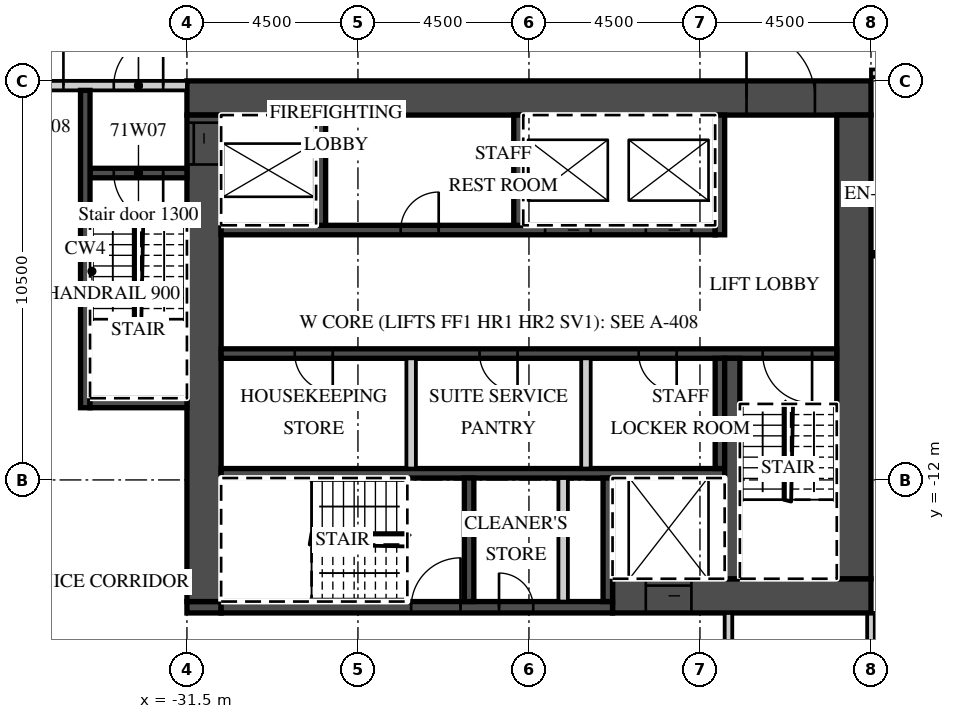
"""IFC4 building model, lengths in metres.
Left out: names, types, materials, properties, quantities, classifications, styles, units other than length and angle.
Written with IfcOpenShell. Run it as: python <this file> out.ifc"""

import sys

from ifc_helpers import new_model, si_unit, direction, frame, frame_2d, origin, place, context, subcontext, project, spatial, rectangle, extrude, element, fill, save


model = new_model("IFC4")
c1 = context("Model", 3, precision=1e-05, world=origin(), true_north=direction((0.0, 1.0)))
c2 = subcontext(c1, "Body", "Model", "MODEL_VIEW")
j1 = project(units=[si_unit("LENGTHUNIT", "METRE"), si_unit("PLANEANGLEUNIT", "RADIAN")], contexts=[c1])
p1 = place(None, origin())
s1 = spatial("IfcSite", under=j1, at=p1, CompositionType="ELEMENT")
p2 = place(p1, origin())
s2 = spatial("IfcBuilding", under=s1, at=p2, CompositionType="ELEMENT")
p3 = place(p2, frame((0.0, 0.0, 285.0)))
s3 = spatial("IfcBuildingStorey", under=s2, at=p3, CompositionType="ELEMENT", Elevation=285.0)
p4 = place(p3, frame((-13.5, -21.396, 0.0), z_axis=(0.0, 0.0, 1.0), x_axis=(0.0, 1.0, 0.0)))
e1 = element("IfcWall", 1, at=p4, inside=s3, PredefinedType="PARTITIONING", context=c2, shape_type="SweptSolid", body=[
    extrude(rectangle(XDim=5.896, YDim=0.2, at=frame_2d((2.948, 0.0))), origin(), (0.0, 0.0, 1.0), 3.02),
])
p5 = place(p3, frame((-13.5, -1.3, 0.0), z_axis=(0.0, 0.0, 1.0), x_axis=(1.0, 0.0, 0.0)))
e2 = element("IfcWall", 2, at=p5, inside=s3, PredefinedType="PARTITIONING", context=c2, shape_type="SweptSolid", body=[
    extrude(rectangle(XDim=50.293, YDim=0.2, at=frame_2d((25.146, 0.0))), origin(), (0.0, 0.0, 1.0), 3.02),
])
p6 = place(p5, frame((2.925, 0.0, 0.0)))
e3 = element("IfcOpeningElement", 3, at=p6, cuts=e2, PredefinedType="OPENING", context=c2, shape_type="SweptSolid", body=[
    extrude(rectangle(XDim=1.0, YDim=2.1, at=frame_2d((0.5, 1.05))), frame((0.0, 0.11, 0.0), z_axis=(0.0, -1.0, 0.0), x_axis=(1.0, 0.0, 0.0)), (0.0, 0.0, 1.0), 0.22),
])
p7 = place(p5, frame((6.938, 0.0, 0.0)))
e4 = element("IfcOpeningElement", 4, at=p7, cuts=e2, PredefinedType="OPENING", context=c2, shape_type="SweptSolid", body=[
    extrude(rectangle(XDim=1.2, YDim=2.1, at=frame_2d((0.6, 1.05))), frame((0.0, 0.11, 0.0), z_axis=(0.0, -1.0, 0.0), x_axis=(1.0, 0.0, 0.0)), (0.0, 0.0, 1.0), 0.22),
])
p8 = place(p5, frame((14.075, 0.0, 0.0)))
e5 = element("IfcOpeningElement", 5, at=p8, cuts=e2, PredefinedType="OPENING", context=c2, shape_type="SweptSolid", body=[
    extrude(rectangle(XDim=1.0, YDim=2.1, at=frame_2d((0.5, 1.05))), frame((0.0, 0.11, 0.0), z_axis=(0.0, -1.0, 0.0), x_axis=(1.0, 0.0, 0.0)), (0.0, 0.0, 1.0), 0.22),
])
p9 = place(p5, frame((18.55, 0.0, 0.0)))
e6 = element("IfcOpeningElement", 6, at=p9, cuts=e2, PredefinedType="OPENING", context=c2, shape_type="SweptSolid", body=[
    extrude(rectangle(XDim=1.0, YDim=2.1, at=frame_2d((0.5, 1.05))), frame((0.0, 0.11, 0.0), z_axis=(0.0, -1.0, 0.0), x_axis=(1.0, 0.0, 0.0)), (0.0, 0.0, 1.0), 0.22),
])
p10 = place(p5, frame((23.075, 0.0, 0.0)))
e7 = element("IfcOpeningElement", 7, at=p10, cuts=e2, PredefinedType="OPENING", context=c2, shape_type="SweptSolid", body=[
    extrude(rectangle(XDim=1.0, YDim=2.1, at=frame_2d((0.5, 1.05))), frame((0.0, 0.11, 0.0), z_axis=(0.0, -1.0, 0.0), x_axis=(1.0, 0.0, 0.0)), (0.0, 0.0, 1.0), 0.22),
])
p11 = place(p5, frame((29.925, 0.0, 0.0)))
e8 = element("IfcOpeningElement", 8, at=p11, cuts=e2, PredefinedType="OPENING", context=c2, shape_type="SweptSolid", body=[
    extrude(rectangle(XDim=1.0, YDim=2.1, at=frame_2d((0.5, 1.05))), frame((0.0, 0.11, 0.0), z_axis=(0.0, -1.0, 0.0), x_axis=(1.0, 0.0, 0.0)), (0.0, 0.0, 1.0), 0.22),
])
p12 = place(p5, frame((32.075, 0.0, 0.0)))
e9 = element("IfcOpeningElement", 9, at=p12, cuts=e2, PredefinedType="OPENING", context=c2, shape_type="SweptSolid", body=[
    extrude(rectangle(XDim=1.0, YDim=2.1, at=frame_2d((0.5, 1.05))), frame((0.0, 0.11, 0.0), z_axis=(0.0, -1.0, 0.0), x_axis=(1.0, 0.0, 0.0)), (0.0, 0.0, 1.0), 0.22),
])
p13 = place(p5, frame((36.55, 0.0, 0.0)))
e10 = element("IfcOpeningElement", 10, at=p13, cuts=e2, PredefinedType="OPENING", context=c2, shape_type="SweptSolid", body=[
    extrude(rectangle(XDim=1.0, YDim=2.1, at=frame_2d((0.5, 1.05))), frame((0.0, 0.11, 0.0), z_axis=(0.0, -1.0, 0.0), x_axis=(1.0, 0.0, 0.0)), (0.0, 0.0, 1.0), 0.22),
])
p14 = place(p5, frame((42.938, 0.0, 0.0)))
e11 = element("IfcOpeningElement", 11, at=p14, cuts=e2, PredefinedType="OPENING", context=c2, shape_type="SweptSolid", body=[
    extrude(rectangle(XDim=1.2, YDim=2.1, at=frame_2d((0.6, 1.05))), frame((0.0, 0.11, 0.0), z_axis=(0.0, -1.0, 0.0), x_axis=(1.0, 0.0, 0.0)), (0.0, 0.0, 1.0), 0.22),
])
p15 = place(p3, frame((-31.5, -1.95, 0.0), z_axis=(0.0, 0.0, 1.0), x_axis=(1.0, 0.0, 0.0)))
e12 = element("IfcWall", 12, at=p15, inside=s3, PredefinedType="SHEAR", context=c2, shape_type="SweptSolid", body=[
    extrude(rectangle(XDim=18.0, YDim=0.9, at=frame_2d((9.0, 0.0))), origin(), (0.0, 0.0, 1.0), 3.02),
])
p16 = place(p15, frame((14.725, 0.0, 0.0)))
e13 = element("IfcOpeningElement", 13, at=p16, cuts=e12, PredefinedType="OPENING", context=c2, shape_type="SweptSolid", body=[
    extrude(rectangle(XDim=1.8, YDim=2.1, at=frame_2d((0.9, 1.05))), frame((0.0, 0.46, 0.0), z_axis=(0.0, -1.0, 0.0), x_axis=(1.0, 0.0, 0.0)), (0.0, 0.0, 1.0), 0.92),
])
p17 = place(p3, frame((-20.3, -15.05, 0.0), z_axis=(0.0, 0.0, 1.0), x_axis=(1.0, 0.0, 0.0)))
e14 = element("IfcWall", 14, at=p17, inside=s3, PredefinedType="SHEAR", context=c2, shape_type="SweptSolid", body=[
    extrude(rectangle(XDim=6.8, YDim=0.9, at=frame_2d((3.4, 0.0))), origin(), (0.0, 0.0, 1.0), 3.02),
])
p18 = place(p17, frame((0.875, 0.0, 0.0)))
e15 = element("IfcOpeningElement", 15, at=p18, cuts=e14, PredefinedType="OPENING", context=c2, shape_type="SweptSolid", body=[
    extrude(rectangle(XDim=1.2, YDim=2.1, at=frame_2d((0.6, 1.05))), frame((0.0, 0.46, 0.0), z_axis=(0.0, -1.0, 0.0), x_axis=(1.0, 0.0, 0.0)), (0.0, 0.0, 1.0), 0.92),
])
p19 = place(p3, frame((-31.5, -15.35, 0.0), z_axis=(0.0, 0.0, 1.0), x_axis=(1.0, 0.0, 0.0)))
e16 = element("IfcWall", 16, at=p19, inside=s3, PredefinedType="SHEAR", context=c2, shape_type="SweptSolid", body=[
    extrude(rectangle(XDim=0.9, YDim=0.3, at=frame_2d((0.45, 0.0))), origin(), (0.0, 0.0, 1.0), 3.02),
])
p20 = place(p3, frame((-30.6, -15.35, 0.0), z_axis=(0.0, 0.0, 1.0), x_axis=(1.0, 0.0, 0.0)))
e17 = element("IfcWall", 17, at=p20, inside=s3, PredefinedType="SHEAR", context=c2, shape_type="SweptSolid", body=[
    extrude(rectangle(XDim=10.3, YDim=0.3, at=frame_2d((5.15, 0.0))), origin(), (0.0, 0.0, 1.0), 3.02),
])
p21 = place(p20, frame((5.0, 0.0, 0.0)))
e18 = element("IfcOpeningElement", 18, at=p21, cuts=e17, PredefinedType="OPENING", context=c2, shape_type="SweptSolid", body=[
    extrude(rectangle(XDim=1.3, YDim=2.1, at=frame_2d((0.65, 1.05))), frame((0.0, 0.16, 0.0), z_axis=(0.0, -1.0, 0.0), x_axis=(1.0, 0.0, 0.0)), (0.0, 0.0, 1.0), 0.32),
])
p22 = place(p20, frame((7.312, 0.0, 0.0)))
e19 = element("IfcOpeningElement", 19, at=p22, cuts=e17, PredefinedType="OPENING", context=c2, shape_type="SweptSolid", body=[
    extrude(rectangle(XDim=0.9, YDim=2.1, at=frame_2d((0.45, 1.05))), frame((0.0, 0.16, 0.0), z_axis=(0.0, -1.0, 0.0), x_axis=(1.0, 0.0, 0.0)), (0.0, 0.0, 1.0), 0.32),
])
p23 = place(p3, frame((-31.05, -15.2, 0.0), z_axis=(0.0, 0.0, 1.0), x_axis=(0.0, 1.0, 0.0)))
e20 = element("IfcWall", 20, at=p23, inside=s3, PredefinedType="SHEAR", context=c2, shape_type="SweptSolid", body=[
    extrude(rectangle(XDim=12.8, YDim=0.9, at=frame_2d((6.4, 0.0))), origin(), (0.0, 0.0, 1.0), 3.02),
])
p24 = place(p23, frame((11.5, 0.0, 0.0)))
e21 = element("IfcOpeningElement", 21, at=p24, cuts=e20, PredefinedType="OPENING", context=c2, shape_type="SweptSolid", body=[
    extrude(rectangle(XDim=1.1, YDim=2.1, at=frame_2d((0.55, 1.05))), frame((0.0, 0.46, 0.0), z_axis=(0.0, -1.0, 0.0), x_axis=(1.0, 0.0, 0.0)), (0.0, 0.0, 1.0), 0.92),
])
p25 = place(p3, frame((-13.95, -14.6, 0.0), z_axis=(0.0, 0.0, 1.0), x_axis=(0.0, 1.0, 0.0)))
e22 = element("IfcWall", 22, at=p25, inside=s3, PredefinedType="SHEAR", context=c2, shape_type="SweptSolid", body=[
    extrude(rectangle(XDim=12.2, YDim=0.9, at=frame_2d((6.1, 0.0))), origin(), (0.0, 0.0, 1.0), 3.02),
])
p26 = place(p3, frame((-30.6, -5.425, 0.0), z_axis=(0.0, 0.0, 1.0), x_axis=(1.0, 0.0, 0.0)))
e23 = element("IfcWall", 23, at=p26, inside=s3, PredefinedType="SHEAR", context=c2, shape_type="SweptSolid", body=[
    extrude(rectangle(XDim=13.0, YDim=0.25, at=frame_2d((6.5, 0.0))), origin(), (0.0, 0.0, 1.0), 3.02),
])
p27 = place(p26, frame((8.525, 0.0, 0.0)))
e24 = element("IfcOpeningElement", 24, at=p27, cuts=e23, PredefinedType="OPENING", context=c2, shape_type="SweptSolid", body=[
    extrude(rectangle(XDim=1.2, YDim=2.1, at=frame_2d((0.6, 1.05))), frame((0.0, 0.135, 0.0), z_axis=(0.0, -1.0, 0.0), x_axis=(1.0, 0.0, 0.0)), (0.0, 0.0, 1.0), 0.27),
])
p28 = place(p26, frame((11.175, 0.0, 0.0)))
e25 = element("IfcOpeningElement", 25, at=p28, cuts=e23, PredefinedType="OPENING", context=c2, shape_type="SweptSolid", body=[
    extrude(rectangle(XDim=1.2, YDim=2.1, at=frame_2d((0.6, 1.05))), frame((0.0, 0.135, 0.0), z_axis=(0.0, -1.0, 0.0), x_axis=(1.0, 0.0, 0.0)), (0.0, 0.0, 1.0), 0.27),
])
p29 = place(p26, frame((4.725, 0.0, 0.0)))
e26 = element("IfcOpeningElement", 26, at=p29, cuts=e23, PredefinedType="OPENING", context=c2, shape_type="SweptSolid", body=[
    extrude(rectangle(XDim=1.0, YDim=2.1, at=frame_2d((0.5, 1.05))), frame((0.0, 0.135, 0.0), z_axis=(0.0, -1.0, 0.0), x_axis=(1.0, 0.0, 0.0)), (0.0, 0.0, 1.0), 0.27),
])
p30 = place(p3, frame((-17.475, -5.55, 0.0), z_axis=(0.0, 0.0, 1.0), x_axis=(0.0, 1.0, 0.0)))
e27 = element("IfcWall", 27, at=p30, inside=s3, PredefinedType="SHEAR", context=c2, shape_type="SweptSolid", body=[
    extrude(rectangle(XDim=3.15, YDim=0.25, at=frame_2d((1.575, 0.0))), origin(), (0.0, 0.0, 1.0), 3.02),
])
for number, where, z_axis, x_axis in (
    (28, (-27.975, -5.3, 0.0), (0.0, 0.0, 1.0), (0.0, 1.0, 0.0)),
    (29, (-22.775, -5.3, 0.0), (0.0, 0.0, 1.0), (0.0, 1.0, 0.0)),
):
    element("IfcWall", number, at=place(p3, frame(where, z_axis=z_axis, x_axis=x_axis)), inside=s3, PredefinedType="SHEAR", context=c2, shape_type="SweptSolid", body=[
        extrude(rectangle(XDim=2.9, YDim=0.25, at=frame_2d((1.45, 0.0))), origin(), (0.0, 0.0, 1.0), 3.02),
    ])
p31 = place(p3, frame((-30.6, -8.675, 0.0), z_axis=(0.0, 0.0, 1.0), x_axis=(1.0, 0.0, 0.0)))
e30 = element("IfcWall", 30, at=p31, inside=s3, PredefinedType="SHEAR", context=c2, shape_type="SweptSolid", body=[
    extrude(rectangle(XDim=16.2, YDim=0.25, at=frame_2d((8.1, 0.0))), origin(), (0.0, 0.0, 1.0), 3.02),
])
p32 = place(p31, frame((14.25, 0.0, 0.0)))
e31 = element("IfcOpeningElement", 31, at=p32, cuts=e30, PredefinedType="OPENING", context=c2, shape_type="SweptSolid", body=[
    extrude(rectangle(XDim=1.3, YDim=2.1, at=frame_2d((0.65, 1.05))), frame((0.0, 0.135, 0.0), z_axis=(0.0, -1.0, 0.0), x_axis=(1.0, 0.0, 0.0)), (0.0, 0.0, 1.0), 0.27),
])
p33 = place(p31, frame((1.938, 0.0, 0.0)))
e32 = element("IfcOpeningElement", 32, at=p33, cuts=e30, PredefinedType="OPENING", context=c2, shape_type="SweptSolid", body=[
    extrude(rectangle(XDim=1.0, YDim=2.1, at=frame_2d((0.5, 1.05))), frame((0.0, 0.135, 0.0), z_axis=(0.0, -1.0, 0.0), x_axis=(1.0, 0.0, 0.0)), (0.0, 0.0, 1.0), 0.27),
])
p34 = place(p31, frame((6.8, 0.0, 0.0)))
e33 = element("IfcOpeningElement", 33, at=p34, cuts=e30, PredefinedType="OPENING", context=c2, shape_type="SweptSolid", body=[
    extrude(rectangle(XDim=1.0, YDim=2.1, at=frame_2d((0.5, 1.05))), frame((0.0, 0.135, 0.0), z_axis=(0.0, -1.0, 0.0), x_axis=(1.0, 0.0, 0.0)), (0.0, 0.0, 1.0), 0.27),
])
p35 = place(p31, frame((10.988, 0.0, 0.0)))
e34 = element("IfcOpeningElement", 34, at=p35, cuts=e30, PredefinedType="OPENING", context=c2, shape_type="SweptSolid", body=[
    extrude(rectangle(XDim=1.0, YDim=2.1, at=frame_2d((0.5, 1.05))), frame((0.0, 0.135, 0.0), z_axis=(0.0, -1.0, 0.0), x_axis=(1.0, 0.0, 0.0)), (0.0, 0.0, 1.0), 0.27),
])
p36 = place(p3, frame((-30.6, -11.825, 0.0), z_axis=(0.0, 0.0, 1.0), x_axis=(1.0, 0.0, 0.0)))
e35 = element("IfcWall", 35, at=p36, inside=s3, PredefinedType="SHEAR", context=c2, shape_type="SweptSolid", body=[
    extrude(rectangle(XDim=13.25, YDim=0.25, at=frame_2d((6.625, 0.0))), origin(), (0.0, 0.0, 1.0), 3.02),
])
p37 = place(p3, frame((-17.475, -11.7, 0.0), z_axis=(0.0, 0.0, 1.0), x_axis=(0.0, 1.0, 0.0)))
e36 = element("IfcWall", 36, at=p37, inside=s3, PredefinedType="SHEAR", context=c2, shape_type="SweptSolid", body=[
    extrude(rectangle(XDim=2.9, YDim=0.25, at=frame_2d((1.45, 0.0))), origin(), (0.0, 0.0, 1.0), 3.02),
])
for number, where, z_axis, x_axis in (
    (37, (-25.6, -11.7, 0.0), (0.0, 0.0, 1.0), (0.0, 1.0, 0.0)),
    (38, (-21.0, -11.7, 0.0), (0.0, 0.0, 1.0), (0.0, 1.0, 0.0)),
):
    element("IfcWall", number, at=place(p3, frame(where, z_axis=z_axis, x_axis=x_axis)), inside=s3, PredefinedType="PARTITIONING", context=c2, shape_type="SweptSolid", body=[
        extrude(rectangle(XDim=2.9, YDim=0.25, at=frame_2d((1.45, 0.0))), origin(), (0.0, 0.0, 1.0), 3.02),
    ])
p38 = place(p3, frame((-17.15, -14.6, 0.0), z_axis=(0.0, 0.0, 1.0), x_axis=(0.0, 1.0, 0.0)))
e39 = element("IfcWall", 39, at=p38, inside=s3, PredefinedType="SHEAR", context=c2, shape_type="SweptSolid", body=[
    extrude(rectangle(XDim=5.8, YDim=0.4, at=frame_2d((2.9, 0.0))), origin(), (0.0, 0.0, 1.0), 3.02),
])
for number, where, z_axis, x_axis in (
    (40, (-20.425, -15.2, 0.0), (0.0, 0.0, 1.0), (0.0, 1.0, 0.0)),
    (41, (-24.075, -15.2, 0.0), (0.0, 0.0, 1.0), (0.0, 1.0, 0.0)),
):
    element("IfcWall", number, at=place(p3, frame(where, z_axis=z_axis, x_axis=x_axis)), inside=s3, PredefinedType="SHEAR", context=c2, shape_type="SweptSolid", body=[
        extrude(rectangle(XDim=3.25, YDim=0.25, at=frame_2d((1.625, 0.0))), origin(), (0.0, 0.0, 1.0), 3.02),
    ])
p39 = place(p3, frame((-21.6, -15.2, 0.0), z_axis=(0.0, 0.0, 1.0), x_axis=(0.0, 1.0, 0.0)))
e42 = element("IfcWall", 42, at=p39, inside=s3, PredefinedType="PARTITIONING", context=c2, shape_type="SweptSolid", body=[
    extrude(rectangle(XDim=3.25, YDim=0.25, at=frame_2d((1.625, 0.0))), origin(), (0.0, 0.0, 1.0), 3.02),
])
p40 = place(p3, frame((-39.627, -1.625, 0.0), z_axis=(0.0, 0.0, 1.0), x_axis=(1.0, 0.0, 0.0)))
e43 = element("IfcWall", 43, at=p40, inside=s3, PredefinedType="PARTITIONING", context=c2, shape_type="SweptSolid", body=[
    extrude(rectangle(XDim=8.127, YDim=0.25, at=frame_2d((4.063, 0.0))), origin(), (0.0, 0.0, 1.0), 3.02),
])
p41 = place(p40, frame((6.202, 0.0, 0.0)))
e44 = element("IfcOpeningElement", 44, at=p41, cuts=e43, PredefinedType="OPENING", context=c2, shape_type="SweptSolid", body=[
    extrude(rectangle(XDim=1.3, YDim=2.1, at=frame_2d((0.65, 1.05))), frame((0.0, 0.135, 0.0), z_axis=(0.0, -1.0, 0.0), x_axis=(1.0, 0.0, 0.0)), (0.0, 0.0, 1.0), 0.27),
])
p42 = place(p40, frame((3.777, 0.0, 0.0)))
e45 = element("IfcOpeningElement", 45, at=p42, cuts=e43, PredefinedType="OPENING", context=c2, shape_type="SweptSolid", body=[
    extrude(rectangle(XDim=1.1, YDim=2.1, at=frame_2d((0.55, 1.05))), frame((0.0, 0.135, 0.0), z_axis=(0.0, -1.0, 0.0), x_axis=(1.0, 0.0, 0.0)), (0.0, 0.0, 1.0), 0.27),
])
p43 = place(p3, frame((-34.05, -3.925, 0.0), z_axis=(0.0, 0.0, 1.0), x_axis=(1.0, 0.0, 0.0)))
e46 = element("IfcWall", 46, at=p43, inside=s3, PredefinedType="SHEAR", context=c2, shape_type="SweptSolid", body=[
    extrude(rectangle(XDim=2.55, YDim=0.25, at=frame_2d((1.275, 0.0))), origin(), (0.0, 0.0, 1.0), 3.02),
])
p44 = place(p43, frame((0.625, 0.0, 0.0)))
e47 = element("IfcOpeningElement", 47, at=p44, cuts=e46, PredefinedType="OPENING", context=c2, shape_type="SweptSolid", body=[
    extrude(rectangle(XDim=1.3, YDim=2.1, at=frame_2d((0.65, 1.05))), frame((0.0, 0.135, 0.0), z_axis=(0.0, -1.0, 0.0), x_axis=(1.0, 0.0, 0.0)), (0.0, 0.0, 1.0), 0.27),
])
p45 = place(p3, frame((-34.175, -10.1, 0.0), z_axis=(0.0, 0.0, 1.0), x_axis=(0.0, 1.0, 0.0)))
e48 = element("IfcWall", 48, at=p45, inside=s3, PredefinedType="SHEAR", context=c2, shape_type="SweptSolid", body=[
    extrude(rectangle(XDim=8.35, YDim=0.25, at=frame_2d((4.175, 0.0))), origin(), (0.0, 0.0, 1.0), 3.02),
])
p46 = place(p3, frame((-34.05, -9.975, 0.0), z_axis=(0.0, 0.0, 1.0), x_axis=(1.0, 0.0, 0.0)))
e49 = element("IfcWall", 49, at=p46, inside=s3, PredefinedType="SHEAR", context=c2, shape_type="SweptSolid", body=[
    extrude(rectangle(XDim=2.55, YDim=0.25, at=frame_2d((1.275, 0.0))), origin(), (0.0, 0.0, 1.0), 3.02),
])
p47 = place(p3, frame((-17.25, -17.7, 0.0), z_axis=(0.0, 0.0, 1.0), x_axis=(0.0, 1.0, 0.0)))
e50 = element("IfcWall", 50, at=p47, inside=s3, PredefinedType="PARTITIONING", context=c2, shape_type="SweptSolid", body=[
    extrude(rectangle(XDim=2.2, YDim=0.2, at=frame_2d((1.1, 0.0))), origin(), (0.0, 0.0, 1.0), 3.02),
])
p48 = place(p27, origin())
e51 = element("IfcDoor", 51, at=p48, inside=s3, OperationType="SLIDING_TO_LEFT", PredefinedType="DOOR", context=c2, shape_type="SweptSolid", body=[
    extrude(rectangle(XDim=1.2, YDim=2.1, at=frame_2d((0.6, 1.05))), frame((0.0, 0.025, 0.0), z_axis=(0.0, -1.0, 0.0), x_axis=(1.0, 0.0, 0.0)), (0.0, 0.0, 1.0), 0.05),
])
fill(e24, e51)
p49 = place(p28, origin())
e52 = element("IfcDoor", 52, at=p49, inside=s3, OperationType="SLIDING_TO_RIGHT", PredefinedType="DOOR", context=c2, shape_type="SweptSolid", body=[
    extrude(rectangle(XDim=1.2, YDim=2.1, at=frame_2d((0.6, 1.05))), frame((0.0, 0.025, 0.0), z_axis=(0.0, -1.0, 0.0), x_axis=(1.0, 0.0, 0.0)), (0.0, 0.0, 1.0), 0.05),
])
fill(e25, e52)
p50 = place(p18, origin())
e53 = element("IfcDoor", 53, at=p50, inside=s3, OperationType="SLIDING_TO_LEFT", PredefinedType="DOOR", context=c2, shape_type="SweptSolid", body=[
    extrude(rectangle(XDim=1.2, YDim=2.1, at=frame_2d((0.6, 1.05))), frame((0.0, 0.025, 0.0), z_axis=(0.0, -1.0, 0.0), x_axis=(1.0, 0.0, 0.0)), (0.0, 0.0, 1.0), 0.05),
])
fill(e15, e53)
p51 = place(p24, origin())
e54 = element("IfcDoor", 54, at=p51, inside=s3, OperationType="SLIDING_TO_RIGHT", PredefinedType="DOOR", context=c2, shape_type="SweptSolid", body=[
    extrude(rectangle(XDim=1.1, YDim=2.1, at=frame_2d((0.55, 1.05))), frame((0.0, 0.025, 0.0), z_axis=(0.0, -1.0, 0.0), x_axis=(1.0, 0.0, 0.0)), (0.0, 0.0, 1.0), 0.05),
])
fill(e21, e54)
p52 = place(p16, origin())
e55 = element("IfcDoor", 55, at=p52, inside=s3, OperationType="DOUBLE_DOOR_DOUBLE_SWING", PredefinedType="DOOR", context=c2, shape_type="SweptSolid", body=[
    extrude(rectangle(XDim=1.8, YDim=2.1, at=frame_2d((0.9, 1.05))), frame((0.0, 0.025, 0.0), z_axis=(0.0, -1.0, 0.0), x_axis=(1.0, 0.0, 0.0)), (0.0, 0.0, 1.0), 0.05),
])
fill(e13, e55)
p53 = place(p41, origin())
e56 = element("IfcDoor", 56, at=p53, inside=s3, OperationType="SINGLE_SWING_RIGHT", PredefinedType="DOOR", context=c2, shape_type="SweptSolid", body=[
    extrude(rectangle(XDim=1.3, YDim=2.1, at=frame_2d((0.65, 1.05))), frame((0.0, 0.025, 0.0), z_axis=(0.0, -1.0, 0.0), x_axis=(1.0, 0.0, 0.0)), (0.0, 0.0, 1.0), 0.05),
])
fill(e44, e56)
p54 = place(p44, origin())
e57 = element("IfcDoor", 57, at=p54, inside=s3, OperationType="SINGLE_SWING_RIGHT", PredefinedType="DOOR", context=c2, shape_type="SweptSolid", body=[
    extrude(rectangle(XDim=1.3, YDim=2.1, at=frame_2d((0.65, 1.05))), frame((0.0, 0.025, 0.0), z_axis=(0.0, -1.0, 0.0), x_axis=(1.0, 0.0, 0.0)), (0.0, 0.0, 1.0), 0.05),
])
fill(e47, e57)
p55 = place(p42, origin())
e58 = element("IfcDoor", 58, at=p55, inside=s3, OperationType="SINGLE_SWING_RIGHT", PredefinedType="DOOR", context=c2, shape_type="SweptSolid", body=[
    extrude(rectangle(XDim=1.1, YDim=2.1, at=frame_2d((0.55, 1.05))), frame((0.0, 0.025, 0.0), z_axis=(0.0, -1.0, 0.0), x_axis=(1.0, 0.0, 0.0)), (0.0, 0.0, 1.0), 0.05),
])
fill(e45, e58)
p56 = place(p32, origin())
e59 = element("IfcDoor", 59, at=p56, inside=s3, OperationType="SINGLE_SWING_RIGHT", PredefinedType="DOOR", context=c2, shape_type="SweptSolid", body=[
    extrude(rectangle(XDim=1.3, YDim=2.1, at=frame_2d((0.65, 1.05))), frame((0.0, 0.025, 0.0), z_axis=(0.0, -1.0, 0.0), x_axis=(1.0, 0.0, 0.0)), (0.0, 0.0, 1.0), 0.05),
])
fill(e31, e59)
p57 = place(p21, origin())
e60 = element("IfcDoor", 60, at=p57, inside=s3, OperationType="SINGLE_SWING_RIGHT", PredefinedType="DOOR", context=c2, shape_type="SweptSolid", body=[
    extrude(rectangle(XDim=1.3, YDim=2.1, at=frame_2d((0.65, 1.05))), frame((0.0, 0.025, 0.0), z_axis=(0.0, -1.0, 0.0), x_axis=(1.0, 0.0, 0.0)), (0.0, 0.0, 1.0), 0.05),
])
fill(e18, e60)
p58 = place(p22, origin())
e61 = element("IfcDoor", 61, at=p58, inside=s3, OperationType="SINGLE_SWING_LEFT", PredefinedType="DOOR", context=c2, shape_type="SweptSolid", body=[
    extrude(rectangle(XDim=0.9, YDim=2.1, at=frame_2d((0.45, 1.05))), frame((0.0, 0.025, 0.0), z_axis=(0.0, -1.0, 0.0), x_axis=(1.0, 0.0, 0.0)), (0.0, 0.0, 1.0), 0.05),
])
fill(e19, e61)
p59 = place(p33, origin())
e62 = element("IfcDoor", 62, at=p59, inside=s3, OperationType="SINGLE_SWING_RIGHT", PredefinedType="DOOR", context=c2, shape_type="SweptSolid", body=[
    extrude(rectangle(XDim=1.0, YDim=2.1, at=frame_2d((0.5, 1.05))), frame((0.0, 0.025, 0.0), z_axis=(0.0, -1.0, 0.0), x_axis=(1.0, 0.0, 0.0)), (0.0, 0.0, 1.0), 0.05),
])
fill(e32, e62)
p60 = place(p34, origin())
e63 = element("IfcDoor", 63, at=p60, inside=s3, OperationType="SINGLE_SWING_RIGHT", PredefinedType="DOOR", context=c2, shape_type="SweptSolid", body=[
    extrude(rectangle(XDim=1.0, YDim=2.1, at=frame_2d((0.5, 1.05))), frame((0.0, 0.025, 0.0), z_axis=(0.0, -1.0, 0.0), x_axis=(1.0, 0.0, 0.0)), (0.0, 0.0, 1.0), 0.05),
])
fill(e33, e63)
p61 = place(p35, origin())
e64 = element("IfcDoor", 64, at=p61, inside=s3, OperationType="SINGLE_SWING_RIGHT", PredefinedType="DOOR", context=c2, shape_type="SweptSolid", body=[
    extrude(rectangle(XDim=1.0, YDim=2.1, at=frame_2d((0.5, 1.05))), frame((0.0, 0.025, 0.0), z_axis=(0.0, -1.0, 0.0), x_axis=(1.0, 0.0, 0.0)), (0.0, 0.0, 1.0), 0.05),
])
fill(e34, e64)
p62 = place(p29, origin())
e65 = element("IfcDoor", 65, at=p62, inside=s3, OperationType="SINGLE_SWING_RIGHT", PredefinedType="DOOR", context=c2, shape_type="SweptSolid", body=[
    extrude(rectangle(XDim=1.0, YDim=2.1, at=frame_2d((0.5, 1.05))), frame((0.0, 0.025, 0.0), z_axis=(0.0, -1.0, 0.0), x_axis=(1.0, 0.0, 0.0)), (0.0, 0.0, 1.0), 0.05),
])
fill(e26, e65)
save(model, sys.argv[1])
